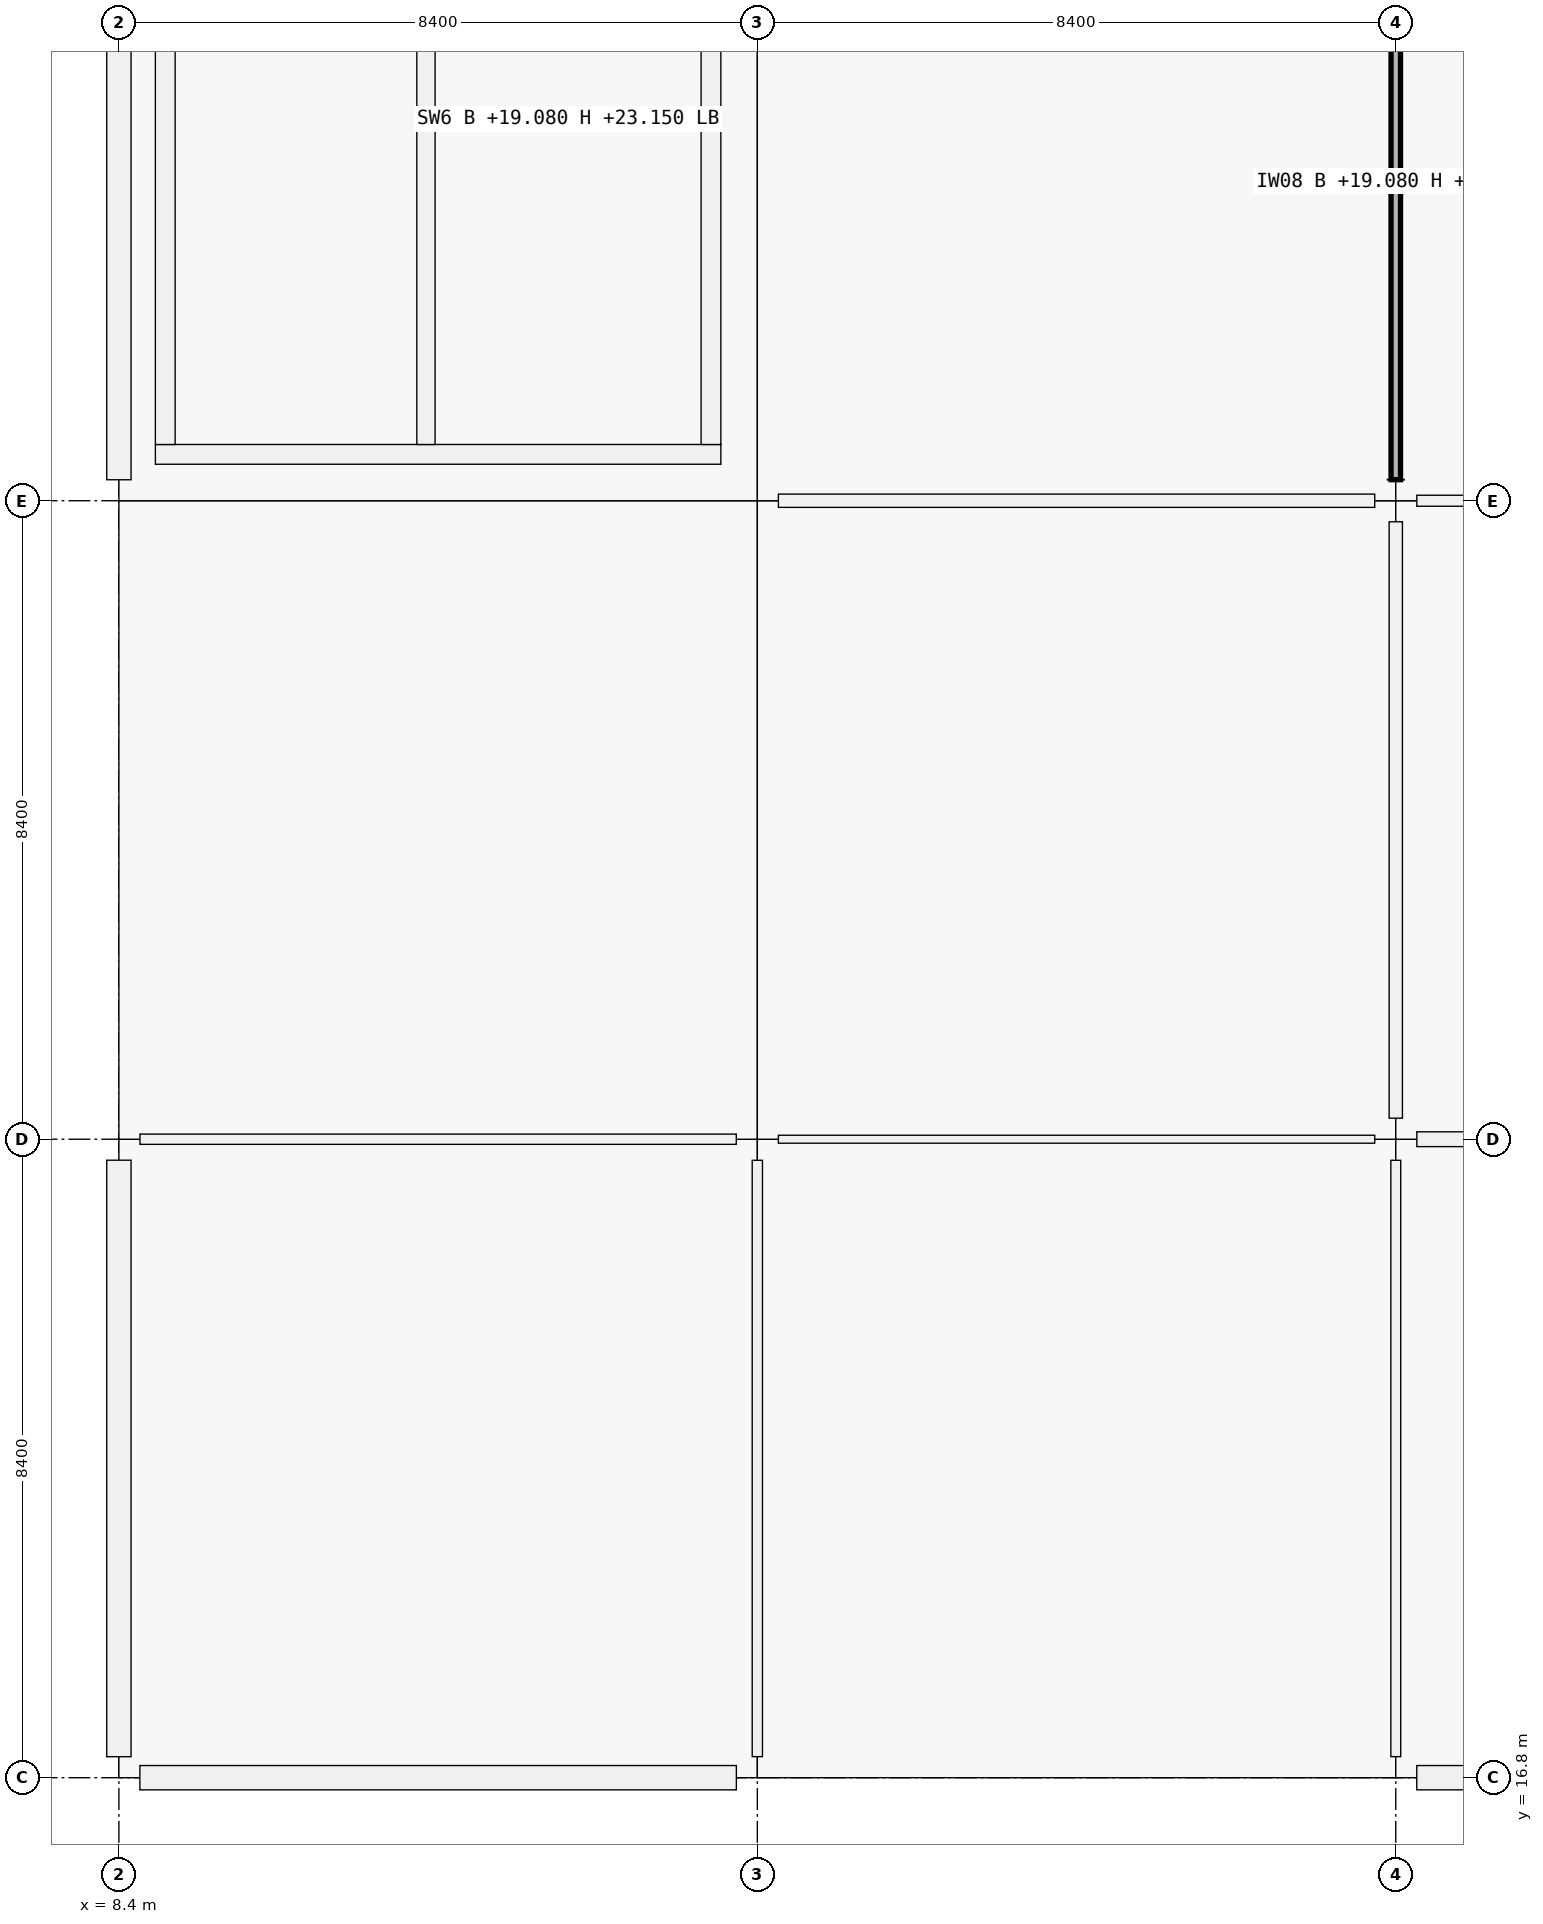
"""IFC4 building model, lengths in metres.
Left out: names, types, materials, properties, quantities, classifications, styles, units other than length and angle.
Written with IfcOpenShell. Run it as: python <this file> out.ifc"""

import sys

from ifc_helpers import new_model, si_unit, direction, frame, frame_2d, origin, origin_2d, place, context, subcontext, project, spatial, rectangle, i_section, extrude, element, fill, save


model = new_model("IFC4")
c1 = context("Model", 3, precision=1e-05, world=origin(), true_north=direction((0.0, 1.0)))
c2 = subcontext(c1, "Body", "Model", "MODEL_VIEW")
j1 = project(units=[si_unit("LENGTHUNIT", "METRE"), si_unit("PLANEANGLEUNIT", "RADIAN")], contexts=[c1])
p1 = place(None, origin())
s1 = spatial("IfcSite", under=j1, at=p1, CompositionType="ELEMENT")
p2 = place(p1, origin())
s2 = spatial("IfcBuilding", under=s1, at=p2, CompositionType="ELEMENT")
p3 = place(p2, frame((0.0, 0.0, 19.08)))
s3 = spatial("IfcBuildingStorey", under=s2, at=p3, CompositionType="ELEMENT", Elevation=19.08)
for number, where, z_axis, x_axis in (
    (1, (8.4, 16.8, 0.0), (0.0, 0.0, 1.0), (1.0, 0.0, 0.0)),
    (2, (8.4, 25.2, 0.0), (0.0, 0.0, 1.0), (1.0, 0.0, 0.0)),
    (3, (8.4, 33.6, 0.0), (0.0, 0.0, 1.0), (1.0, 0.0, 0.0)),
    (4, (16.8, 16.8, 0.0), (0.0, 0.0, 1.0), (1.0, 0.0, 0.0)),
    (5, (16.8, 25.2, 0.0), (0.0, 0.0, 1.0), (1.0, 0.0, 0.0)),
    (6, (16.8, 33.6, 0.0), (0.0, 0.0, 1.0), (1.0, 0.0, 0.0)),
    (7, (25.2, 16.8, 0.0), (0.0, 0.0, 1.0), (1.0, 0.0, 0.0)),
    (8, (25.2, 25.2, 0.0), (0.0, 0.0, 1.0), (1.0, 0.0, 0.0)),
    (9, (25.2, 33.6, 0.0), (0.0, 0.0, 1.0), (1.0, 0.0, 0.0)),
):
    element("IfcColumn", number, at=place(p3, frame(where, z_axis=z_axis, x_axis=x_axis)), inside=s3, PredefinedType="COLUMN", context=c2, shape_type="SweptSolid", body=[
        extrude(rectangle(XDim=0.55, YDim=0.55, at=origin_2d()), origin(), (0.0, 0.0, 1.0), 4.16),
    ])
for number, where, z_axis, x_axis in (
    (10, (16.8, 16.8, 4.16), (0.0, 0.0, 1.0), (1.0, 0.0, 0.0)),
    (11, (25.2, 16.8, 4.16), (0.0, 0.0, 1.0), (1.0, 0.0, 0.0)),
    (12, (16.8, 25.2, 4.16), (0.0, 0.0, 1.0), (1.0, 0.0, 0.0)),
    (13, (25.2, 25.2, 4.16), (0.0, 0.0, 1.0), (1.0, 0.0, 0.0)),
    (14, (16.8, 33.6, 4.16), (0.0, 0.0, 1.0), (1.0, 0.0, 0.0)),
    (15, (25.2, 33.6, 4.16), (0.0, 0.0, 1.0), (1.0, 0.0, 0.0)),
):
    element("IfcColumn", number, at=place(p3, frame(where, z_axis=z_axis, x_axis=x_axis)), inside=s3, PredefinedType="COLUMN", context=c2, shape_type="SweptSolid", body=[
        extrude(i_section(OverallWidth=0.305, OverallDepth=0.308, WebThickness=0.01, FlangeThickness=0.015, FilletRadius=0.017, at=origin_2d()), origin(), (0.0, 0.0, 1.0), 1.925),
    ])
p4 = place(p3, frame((16.524, 16.8, 0.0), z_axis=(0.0, 0.0, 1.0), x_axis=(-1.0, 0.0, 0.0)))
e16 = element("IfcWall", 16, at=p4, inside=s3, PredefinedType="SOLIDWALL", context=c2, shape_type="SweptSolid", body=[
    extrude(rectangle(XDim=7.848, YDim=0.32, at=frame_2d((3.924, 0.0))), origin(), (0.0, 0.0, 1.0), 3.37),
])
p5 = place(p4, frame((2.324, 0.0, 0.9)))
e17 = element("IfcOpeningElement", 17, at=p5, cuts=e16, PredefinedType="OPENING", context=c2, shape_type="SweptSolid", body=[
    extrude(rectangle(XDim=3.2, YDim=1.75, at=frame_2d((1.6, 0.875))), frame((0.0, 0.16, 0.0), z_axis=(0.0, -1.0, 0.0), x_axis=(1.0, 0.0, 0.0)), (0.0, 0.0, 1.0), 0.32),
])
p6 = place(p3, frame((8.4, 17.076, 0.0), z_axis=(0.0, 0.0, 1.0), x_axis=(0.0, 1.0, 0.0)))
e18 = element("IfcWall", 18, at=p6, inside=s3, PredefinedType="SOLIDWALL", context=c2, shape_type="SweptSolid", body=[
    extrude(rectangle(XDim=7.848, YDim=0.32, at=frame_2d((3.924, 0.0))), origin(), (0.0, 0.0, 1.0), 3.37),
])
p7 = place(p6, frame((2.674, 0.0, 0.9)))
e19 = element("IfcOpeningElement", 19, at=p7, cuts=e18, PredefinedType="OPENING", context=c2, shape_type="SweptSolid", body=[
    extrude(rectangle(XDim=2.5, YDim=1.65, at=frame_2d((1.25, 0.825))), frame((0.0, 0.16, 0.0), z_axis=(0.0, -1.0, 0.0), x_axis=(1.0, 0.0, 0.0)), (0.0, 0.0, 1.0), 0.32),
])
p8 = place(p3, frame((8.4, 33.876, 0.0), z_axis=(0.0, 0.0, 1.0), x_axis=(0.0, 1.0, 0.0)))
e20 = element("IfcWall", 20, at=p8, inside=s3, PredefinedType="SOLIDWALL", context=c2, shape_type="SweptSolid", body=[
    extrude(rectangle(XDim=7.848, YDim=0.32, at=frame_2d((3.924, 0.0))), origin(), (0.0, 0.0, 1.0), 3.37),
])
p9 = place(p3, frame((33.324, 16.8, 0.0), z_axis=(0.0, 0.0, 1.0), x_axis=(-1.0, 0.0, 0.0)))
e21 = element("IfcWall", 21, at=p9, inside=s3, PredefinedType="SOLIDWALL", context=c2, shape_type="SweptSolid", body=[
    extrude(rectangle(XDim=7.848, YDim=0.32, at=frame_2d((3.924, 0.0))), origin(), (0.0, 0.0, 1.0), 3.37),
])
p10 = place(p3, frame((16.32, 34.21, 0.0), z_axis=(0.0, 0.0, 1.0), x_axis=(-1.0, 0.0, 0.0)))
e22 = element("IfcWall", 22, at=p10, inside=s3, PredefinedType="SHEAR", context=c2, shape_type="SweptSolid", body=[
    extrude(rectangle(XDim=7.44, YDim=0.26, at=frame_2d((3.72, 0.0))), origin(), (0.0, 0.0, 1.0), 4.07),
])
p11 = place(p10, frame((1.28, 0.0, 0.0)))
e23 = element("IfcOpeningElement", 23, at=p11, cuts=e22, PredefinedType="OPENING", context=c2, shape_type="SweptSolid", body=[
    extrude(rectangle(XDim=1.5, YDim=2.15, at=frame_2d((0.75, 1.075))), frame((0.0, 0.13, 0.0), z_axis=(0.0, -1.0, 0.0), x_axis=(1.0, 0.0, 0.0)), (0.0, 0.0, 1.0), 0.26),
])
for number, where, z_axis, x_axis in (
    (24, (9.01, 34.34, 0.0), (0.0, 0.0, 1.0), (0.0, 1.0, 0.0)),
    (25, (16.19, 41.26, 0.0), (0.0, 0.0, 1.0), (0.0, -1.0, 0.0)),
):
    element("IfcWall", number, at=place(p3, frame(where, z_axis=z_axis, x_axis=x_axis)), inside=s3, PredefinedType="SHEAR", context=c2, shape_type="SweptSolid", body=[
        extrude(rectangle(XDim=6.92, YDim=0.26, at=frame_2d((3.46, 0.0))), origin(), (0.0, 0.0, 1.0), 4.07),
    ])
p12 = place(p3, frame((12.44, 34.34, 0.0), z_axis=(0.0, 0.0, 1.0), x_axis=(0.0, 1.0, 0.0)))
e26 = element("IfcWall", 26, at=p12, inside=s3, PredefinedType="SHEAR", context=c2, shape_type="SweptSolid", body=[
    extrude(rectangle(XDim=6.92, YDim=0.24, at=frame_2d((3.46, 0.0))), origin(), (0.0, 0.0, 1.0), 4.07),
])
p13 = place(p12, frame((0.12, 0.0, 0.0)))
e27 = element("IfcOpeningElement", 27, at=p13, cuts=e26, PredefinedType="OPENING", context=c2, shape_type="SweptSolid", body=[
    extrude(rectangle(XDim=1.0, YDim=2.15, at=frame_2d((0.5, 1.075))), frame((0.0, 0.12, 0.0), z_axis=(0.0, -1.0, 0.0), x_axis=(1.0, 0.0, 0.0)), (0.0, 0.0, 1.0), 0.24),
])
p14 = place(p3, frame((12.56, 38.62, 0.0), z_axis=(0.0, 0.0, 1.0), x_axis=(1.0, 0.0, 0.0)))
e28 = element("IfcWall", 28, at=p14, inside=s3, PredefinedType="SHEAR", context=c2, shape_type="SweptSolid", body=[
    extrude(rectangle(XDim=3.5, YDim=0.24, at=frame_2d((1.75, 0.0))), origin(), (0.0, 0.0, 1.0), 4.07),
])
p15 = place(p14, frame((1.2, 0.0, 0.0)))
e29 = element("IfcOpeningElement", 29, at=p15, cuts=e28, PredefinedType="OPENING", context=c2, shape_type="SweptSolid", body=[
    extrude(rectangle(XDim=1.1, YDim=2.15, at=frame_2d((0.55, 1.075))), frame((0.0, 0.12, 0.0), z_axis=(0.0, -1.0, 0.0), x_axis=(1.0, 0.0, 0.0)), (0.0, 0.0, 1.0), 0.24),
])
p16 = place(p3, frame((8.677, 25.2, 0.0), z_axis=(0.0, 0.0, 1.0), x_axis=(1.0, 0.0, 0.0)))
e30 = element("IfcWall", 30, at=p16, inside=s3, PredefinedType="PARTITIONING", context=c2, shape_type="SweptSolid", body=[
    extrude(rectangle(XDim=7.846, YDim=0.135, at=frame_2d((3.923, 0.0))), origin(), (0.0, 0.0, 1.0), 3.19),
])
p17 = place(p16, frame((3.463, 0.0, 0.0)))
e31 = element("IfcOpeningElement", 31, at=p17, cuts=e30, PredefinedType="OPENING", context=c2, shape_type="SweptSolid", body=[
    extrude(rectangle(XDim=0.92, YDim=2.15, at=frame_2d((0.46, 1.075))), frame((0.0, 0.067, 0.0), z_axis=(0.0, -1.0, 0.0), x_axis=(1.0, 0.0, 0.0)), (0.0, 0.0, 1.0), 0.135),
])
p18 = place(p3, frame((17.077, 25.2, 0.0), z_axis=(0.0, 0.0, 1.0), x_axis=(1.0, 0.0, 0.0)))
e32 = element("IfcWall", 32, at=p18, inside=s3, PredefinedType="PARTITIONING", context=c2, shape_type="SweptSolid", body=[
    extrude(rectangle(XDim=7.846, YDim=0.105, at=frame_2d((3.923, 0.0))), origin(), (0.0, 0.0, 1.0), 3.19),
])
p19 = place(p18, frame((3.418, 0.0, 0.0)))
e33 = element("IfcOpeningElement", 33, at=p19, cuts=e32, PredefinedType="OPENING", context=c2, shape_type="SweptSolid", body=[
    extrude(rectangle(XDim=1.01, YDim=2.12, at=frame_2d((0.505, 1.06))), frame((0.0, 0.052, 0.0), z_axis=(0.0, -1.0, 0.0), x_axis=(1.0, 0.0, 0.0)), (0.0, 0.0, 1.0), 0.105),
])
p20 = place(p3, frame((17.077, 33.6, 0.0), z_axis=(0.0, 0.0, 1.0), x_axis=(1.0, 0.0, 0.0)))
e34 = element("IfcWall", 34, at=p20, inside=s3, PredefinedType="PARTITIONING", context=c2, shape_type="SweptSolid", body=[
    extrude(rectangle(XDim=7.846, YDim=0.175, at=frame_2d((3.923, 0.0))), origin(), (0.0, 0.0, 1.0), 3.19),
])
p21 = place(p20, frame((3.438, 0.0, 0.0)))
e35 = element("IfcOpeningElement", 35, at=p21, cuts=e34, PredefinedType="OPENING", context=c2, shape_type="SweptSolid", body=[
    extrude(rectangle(XDim=0.97, YDim=2.12, at=frame_2d((0.485, 1.06))), frame((0.0, 0.087, 0.0), z_axis=(0.0, -1.0, 0.0), x_axis=(1.0, 0.0, 0.0)), (0.0, 0.0, 1.0), 0.175),
])
p22 = place(p3, frame((25.477, 25.2, 0.0), z_axis=(0.0, 0.0, 1.0), x_axis=(1.0, 0.0, 0.0)))
e36 = element("IfcWall", 36, at=p22, inside=s3, PredefinedType="PARTITIONING", context=c2, shape_type="SweptSolid", body=[
    extrude(rectangle(XDim=7.846, YDim=0.195, at=frame_2d((3.923, 0.0))), origin(), (0.0, 0.0, 1.0), 3.19),
])
p23 = place(p22, frame((3.418, 0.0, 0.0)))
e37 = element("IfcOpeningElement", 37, at=p23, cuts=e36, PredefinedType="OPENING", context=c2, shape_type="SweptSolid", body=[
    extrude(rectangle(XDim=1.01, YDim=2.12, at=frame_2d((0.505, 1.06))), frame((0.0, 0.098, 0.0), z_axis=(0.0, -1.0, 0.0), x_axis=(1.0, 0.0, 0.0)), (0.0, 0.0, 1.0), 0.195),
])
p24 = place(p3, frame((25.477, 33.6, 0.0), z_axis=(0.0, 0.0, 1.0), x_axis=(1.0, 0.0, 0.0)))
e38 = element("IfcWall", 38, at=p24, inside=s3, PredefinedType="PARTITIONING", context=c2, shape_type="SweptSolid", body=[
    extrude(rectangle(XDim=7.846, YDim=0.145, at=frame_2d((3.923, 0.0))), origin(), (0.0, 0.0, 1.0), 3.19),
])
p25 = place(p24, frame((3.438, 0.0, 0.0)))
e39 = element("IfcOpeningElement", 39, at=p25, cuts=e38, PredefinedType="OPENING", context=c2, shape_type="SweptSolid", body=[
    extrude(rectangle(XDim=0.97, YDim=2.12, at=frame_2d((0.485, 1.06))), frame((0.0, 0.073, 0.0), z_axis=(0.0, -1.0, 0.0), x_axis=(1.0, 0.0, 0.0)), (0.0, 0.0, 1.0), 0.145),
])
p26 = place(p3, frame((16.8, 17.077, 0.0), z_axis=(0.0, 0.0, 1.0), x_axis=(0.0, 1.0, 0.0)))
e40 = element("IfcWall", 40, at=p26, inside=s3, PredefinedType="PARTITIONING", context=c2, shape_type="SweptSolid", body=[
    extrude(rectangle(XDim=7.846, YDim=0.135, at=frame_2d((3.923, 0.0))), origin(), (0.0, 0.0, 1.0), 3.19),
])
p27 = place(p26, frame((3.463, 0.0, 0.0)))
e41 = element("IfcOpeningElement", 41, at=p27, cuts=e40, PredefinedType="OPENING", context=c2, shape_type="SweptSolid", body=[
    extrude(rectangle(XDim=0.92, YDim=2.15, at=frame_2d((0.46, 1.075))), frame((0.0, 0.067, 0.0), z_axis=(0.0, -1.0, 0.0), x_axis=(1.0, 0.0, 0.0)), (0.0, 0.0, 1.0), 0.135),
])
p28 = place(p3, frame((25.2, 17.077, 0.0), z_axis=(0.0, 0.0, 1.0), x_axis=(0.0, 1.0, 0.0)))
e42 = element("IfcWall", 42, at=p28, inside=s3, PredefinedType="MOVABLE", context=c2, shape_type="SweptSolid", body=[
    extrude(rectangle(XDim=7.846, YDim=0.13, at=frame_2d((3.923, 0.0))), origin(), (0.0, 0.0, 1.0), 3.19),
])
p29 = place(p28, frame((3.398, 0.0, 0.0)))
e43 = element("IfcOpeningElement", 43, at=p29, cuts=e42, PredefinedType="OPENING", context=c2, shape_type="SweptSolid", body=[
    extrude(rectangle(XDim=1.05, YDim=2.12, at=frame_2d((0.525, 1.06))), frame((0.0, 0.065, 0.0), z_axis=(0.0, -1.0, 0.0), x_axis=(1.0, 0.0, 0.0)), (0.0, 0.0, 1.0), 0.13),
])
p30 = place(p3, frame((25.2, 25.477, 0.0), z_axis=(0.0, 0.0, 1.0), x_axis=(0.0, 1.0, 0.0)))
e44 = element("IfcWall", 44, at=p30, inside=s3, PredefinedType="PARTITIONING", context=c2, shape_type="SweptSolid", body=[
    extrude(rectangle(XDim=7.846, YDim=0.175, at=frame_2d((3.923, 0.0))), origin(), (0.0, 0.0, 1.0), 3.19),
])
p31 = place(p30, frame((3.413, 0.0, 0.0)))
e45 = element("IfcOpeningElement", 45, at=p31, cuts=e44, PredefinedType="OPENING", context=c2, shape_type="SweptSolid", body=[
    extrude(rectangle(XDim=1.02, YDim=2.2, at=frame_2d((0.51, 1.1))), frame((0.0, 0.087, 0.0), z_axis=(0.0, -1.0, 0.0), x_axis=(1.0, 0.0, 0.0)), (0.0, 0.0, 1.0), 0.175),
])
p32 = place(p3, frame((25.2, 33.877, 0.0), z_axis=(0.0, 0.0, 1.0), x_axis=(0.0, 1.0, 0.0)))
e46 = element("IfcWall", 46, at=p32, inside=s3, PredefinedType="PARTITIONING", context=c2, shape_type="SweptSolid", body=[
    extrude(rectangle(XDim=7.846, YDim=0.125, at=frame_2d((3.923, 0.0))), origin(), (0.0, 0.0, 1.0), 3.19),
])
p33 = place(p32, frame((3.418, 0.0, 0.0)))
e47 = element("IfcOpeningElement", 47, at=p33, cuts=e46, PredefinedType="OPENING", context=c2, shape_type="SweptSolid", body=[
    extrude(rectangle(XDim=1.01, YDim=2.12, at=frame_2d((0.505, 1.06))), frame((0.0, 0.062, 0.0), z_axis=(0.0, -1.0, 0.0), x_axis=(1.0, 0.0, 0.0)), (0.0, 0.0, 1.0), 0.125),
])
p34 = place(p5, origin())
e48 = element("IfcWindow", 48, at=p34, inside=s3, PartitioningType="SINGLE_PANEL", PredefinedType="WINDOW", context=c2, shape_type="SweptSolid", body=[
    extrude(rectangle(XDim=3.2, YDim=1.75, at=frame_2d((1.6, 0.875))), frame((0.0, 0.03, 0.0), z_axis=(0.0, -1.0, 0.0), x_axis=(1.0, 0.0, 0.0)), (0.0, 0.0, 1.0), 0.06),
])
fill(e17, e48)
p35 = place(p7, origin())
e49 = element("IfcWindow", 49, at=p35, inside=s3, PartitioningType="SINGLE_PANEL", PredefinedType="WINDOW", context=c2, shape_type="SweptSolid", body=[
    extrude(rectangle(XDim=2.5, YDim=1.65, at=frame_2d((1.25, 0.825))), frame((0.0, 0.03, 0.0), z_axis=(0.0, -1.0, 0.0), x_axis=(1.0, 0.0, 0.0)), (0.0, 0.0, 1.0), 0.06),
])
fill(e19, e49)
p36 = place(p13, origin())
e50 = element("IfcDoor", 50, at=p36, inside=s3, OperationType="SINGLE_SWING_RIGHT", PredefinedType="DOOR", context=c2, shape_type="SweptSolid", body=[
    extrude(rectangle(XDim=1.0, YDim=2.15, at=frame_2d((0.5, 1.075))), frame((0.0, 0.025, 0.0), z_axis=(0.0, -1.0, 0.0), x_axis=(1.0, 0.0, 0.0)), (0.0, 0.0, 1.0), 0.05),
])
fill(e27, e50)
p37 = place(p11, origin())
e51 = element("IfcDoor", 51, at=p37, inside=s3, OperationType="DOUBLE_DOOR_SINGLE_SWING", PredefinedType="DOOR", context=c2, shape_type="SweptSolid", body=[
    extrude(rectangle(XDim=1.5, YDim=2.15, at=frame_2d((0.75, 1.075))), frame((0.0, 0.025, 0.0), z_axis=(0.0, -1.0, 0.0), x_axis=(1.0, 0.0, 0.0)), (0.0, 0.0, 1.0), 0.05),
])
fill(e23, e51)
p38 = place(p15, origin())
e52 = element("IfcDoor", 52, at=p38, inside=s3, OperationType="DOUBLE_DOOR_SLIDING", PredefinedType="DOOR", context=c2, shape_type="SweptSolid", body=[
    extrude(rectangle(XDim=1.1, YDim=2.15, at=frame_2d((0.55, 1.075))), frame((0.0, 0.025, 0.0), z_axis=(0.0, -1.0, 0.0), x_axis=(1.0, 0.0, 0.0)), (0.0, 0.0, 1.0), 0.05),
])
fill(e29, e52)
p39 = place(p17, origin())
e53 = element("IfcDoor", 53, at=p39, inside=s3, OperationType="SINGLE_SWING_LEFT", PredefinedType="DOOR", context=c2, shape_type="SweptSolid", body=[
    extrude(rectangle(XDim=0.92, YDim=2.15, at=frame_2d((0.46, 1.075))), frame((0.0, 0.025, 0.0), z_axis=(0.0, -1.0, 0.0), x_axis=(1.0, 0.0, 0.0)), (0.0, 0.0, 1.0), 0.05),
])
fill(e31, e53)
p40 = place(p19, origin())
e54 = element("IfcDoor", 54, at=p40, inside=s3, OperationType="SINGLE_SWING_LEFT", PredefinedType="DOOR", context=c2, shape_type="SweptSolid", body=[
    extrude(rectangle(XDim=1.01, YDim=2.12, at=frame_2d((0.505, 1.06))), frame((0.0, 0.025, 0.0), z_axis=(0.0, -1.0, 0.0), x_axis=(1.0, 0.0, 0.0)), (0.0, 0.0, 1.0), 0.05),
])
fill(e33, e54)
p41 = place(p21, origin())
e55 = element("IfcDoor", 55, at=p41, inside=s3, OperationType="SINGLE_SWING_RIGHT", PredefinedType="DOOR", context=c2, shape_type="SweptSolid", body=[
    extrude(rectangle(XDim=0.97, YDim=2.12, at=frame_2d((0.485, 1.06))), frame((0.0, 0.025, 0.0), z_axis=(0.0, -1.0, 0.0), x_axis=(1.0, 0.0, 0.0)), (0.0, 0.0, 1.0), 0.05),
])
fill(e35, e55)
p42 = place(p31, origin())
e56 = element("IfcDoor", 56, at=p42, inside=s3, OperationType="SINGLE_SWING_LEFT", PredefinedType="DOOR", context=c2, shape_type="SweptSolid", body=[
    extrude(rectangle(XDim=1.02, YDim=2.2, at=frame_2d((0.51, 1.1))), frame((0.0, 0.025, 0.0), z_axis=(0.0, -1.0, 0.0), x_axis=(1.0, 0.0, 0.0)), (0.0, 0.0, 1.0), 0.05),
])
fill(e45, e56)
p43 = place(p27, origin())
e57 = element("IfcDoor", 57, at=p43, inside=s3, OperationType="SINGLE_SWING_LEFT", PredefinedType="DOOR", context=c2, shape_type="SweptSolid", body=[
    extrude(rectangle(XDim=0.92, YDim=2.15, at=frame_2d((0.46, 1.075))), frame((0.0, 0.025, 0.0), z_axis=(0.0, -1.0, 0.0), x_axis=(1.0, 0.0, 0.0)), (0.0, 0.0, 1.0), 0.05),
])
fill(e41, e57)
p44 = place(p29, origin())
e58 = element("IfcDoor", 58, at=p44, inside=s3, OperationType="SINGLE_SWING_RIGHT", PredefinedType="DOOR", context=c2, shape_type="SweptSolid", body=[
    extrude(rectangle(XDim=1.05, YDim=2.12, at=frame_2d((0.525, 1.06))), frame((0.0, 0.025, 0.0), z_axis=(0.0, -1.0, 0.0), x_axis=(1.0, 0.0, 0.0)), (0.0, 0.0, 1.0), 0.05),
])
fill(e43, e58)
p45 = place(p33, origin())
e59 = element("IfcDoor", 59, at=p45, inside=s3, OperationType="SINGLE_SWING_LEFT", PredefinedType="DOOR", context=c2, shape_type="SweptSolid", body=[
    extrude(rectangle(XDim=1.01, YDim=2.12, at=frame_2d((0.505, 1.06))), frame((0.0, 0.025, 0.0), z_axis=(0.0, -1.0, 0.0), x_axis=(1.0, 0.0, 0.0)), (0.0, 0.0, 1.0), 0.05),
])
fill(e47, e59)
save(model, sys.argv[1])
